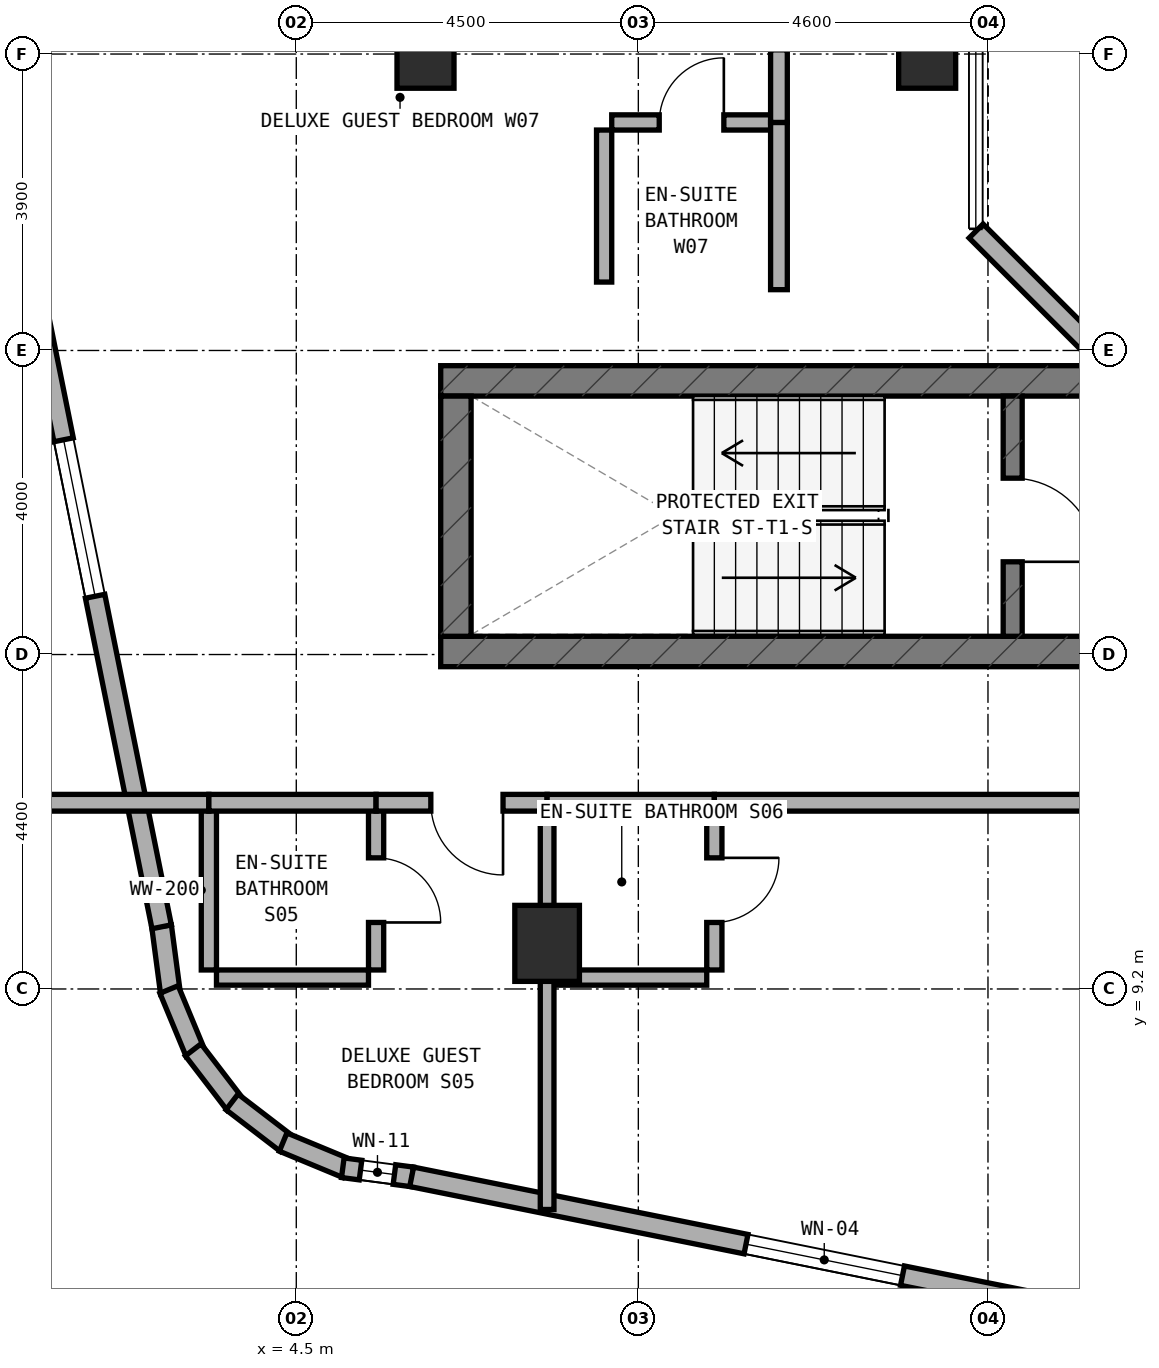
"""IFC4 building model, lengths in metres.
Left out: names, types, materials, properties, quantities, classifications, styles, units other than length and angle.
Written with IfcOpenShell. Run it as: python <this file> out.ifc"""

import sys

from ifc_helpers import new_model, si_unit, direction, frame, frame_2d, origin, origin_2d, place, context, subcontext, project, spatial, rectangle, extrude, element, fill, save


model = new_model("IFC4")
c1 = context("Model", 3, precision=1e-05, world=origin(), true_north=direction((0.0, 1.0)))
c2 = subcontext(c1, "Body", "Model", "MODEL_VIEW")
j1 = project(units=[si_unit("LENGTHUNIT", "METRE"), si_unit("PLANEANGLEUNIT", "RADIAN")], contexts=[c1])
p1 = place(None, origin())
s1 = spatial("IfcSite", under=j1, at=p1, CompositionType="ELEMENT")
p2 = place(p1, origin())
s2 = spatial("IfcBuilding", under=s1, at=p2, CompositionType="ELEMENT")
p3 = place(p2, frame((0.0, 0.0, 152.0)))
s3 = spatial("IfcBuildingStorey", under=s2, at=p3, CompositionType="ELEMENT", Elevation=152.0)
p4 = place(p3, frame((6.4, 13.64, 0.0), z_axis=(0.0, 0.0, 1.0), x_axis=(1.0, 0.0, 0.0)))
e1 = element("IfcWall", 1, at=p4, inside=s3, PredefinedType="SHEAR", context=c2, shape_type="SweptSolid", body=[
    extrude(rectangle(XDim=24.4, YDim=0.4, at=frame_2d((12.2, 0.0))), origin(), (0.0, 0.0, 1.0), 3.5),
])
p5 = place(p4, frame((9.15, 0.0, 0.0)))
e2 = element("IfcOpeningElement", 2, at=p5, cuts=e1, PredefinedType="OPENING", context=c2, shape_type="SweptSolid", body=[
    extrude(rectangle(XDim=1.2, YDim=2.15, at=frame_2d((0.6, 1.075))), frame((0.0, 0.21, 0.0), z_axis=(0.0, -1.0, 0.0), x_axis=(1.0, 0.0, 0.0)), (0.0, 0.0, 1.0), 0.42),
])
p6 = place(p4, frame((16.94, 0.0, 0.0)))
e3 = element("IfcOpeningElement", 3, at=p6, cuts=e1, PredefinedType="OPENING", context=c2, shape_type="SweptSolid", body=[
    extrude(rectangle(XDim=0.85, YDim=2.1, at=frame_2d((0.425, 1.05))), frame((0.0, 0.21, 0.0), z_axis=(0.0, -1.0, 0.0), x_axis=(1.0, 0.0, 0.0)), (0.0, 0.0, 1.0), 0.42),
])
p7 = place(p4, frame((18.783, 0.0, 0.0)))
e4 = element("IfcOpeningElement", 4, at=p7, cuts=e1, PredefinedType="OPENING", context=c2, shape_type="SweptSolid", body=[
    extrude(rectangle(XDim=1.1, YDim=2.15, at=frame_2d((0.55, 1.075))), frame((0.0, 0.21, 0.0), z_axis=(0.0, -1.0, 0.0), x_axis=(1.0, 0.0, 0.0)), (0.0, 0.0, 1.0), 0.42),
])
p8 = place(p4, frame((20.65, 0.0, 0.0)))
e5 = element("IfcOpeningElement", 5, at=p8, cuts=e1, PredefinedType="OPENING", context=c2, shape_type="SweptSolid", body=[
    extrude(rectangle(XDim=1.1, YDim=2.15, at=frame_2d((0.55, 1.075))), frame((0.0, 0.21, 0.0), z_axis=(0.0, -1.0, 0.0), x_axis=(1.0, 0.0, 0.0)), (0.0, 0.0, 1.0), 0.42),
])
p9 = place(p4, frame((22.517, 0.0, 0.0)))
e6 = element("IfcOpeningElement", 6, at=p9, cuts=e1, PredefinedType="OPENING", context=c2, shape_type="SweptSolid", body=[
    extrude(rectangle(XDim=1.1, YDim=2.15, at=frame_2d((0.55, 1.075))), frame((0.0, 0.21, 0.0), z_axis=(0.0, -1.0, 0.0), x_axis=(1.0, 0.0, 0.0)), (0.0, 0.0, 1.0), 0.42),
])
p10 = place(p3, frame((6.4, 17.2, 0.0), z_axis=(0.0, 0.0, 1.0), x_axis=(1.0, 0.0, 0.0)))
e7 = element("IfcWall", 7, at=p10, inside=s3, PredefinedType="SHEAR", context=c2, shape_type="SweptSolid", body=[
    extrude(rectangle(XDim=24.4, YDim=0.4, at=frame_2d((12.2, 0.0))), origin(), (0.0, 0.0, 1.0), 3.5),
])
p11 = place(p3, frame((6.6, 13.84, 0.0), z_axis=(0.0, 0.0, 1.0), x_axis=(0.0, 1.0, 0.0)))
e8 = element("IfcWall", 8, at=p11, inside=s3, PredefinedType="SHEAR", context=c2, shape_type="SweptSolid", body=[
    extrude(rectangle(XDim=3.16, YDim=0.4, at=frame_2d((1.58, 0.0))), origin(), (0.0, 0.0, 1.0), 3.5),
])
p12 = place(p3, frame((13.925, 13.84, 0.0), z_axis=(0.0, 0.0, 1.0), x_axis=(0.0, 1.0, 0.0)))
e9 = element("IfcWall", 9, at=p12, inside=s3, PredefinedType="STANDARD", context=c2, shape_type="SweptSolid", body=[
    extrude(rectangle(XDim=3.16, YDim=0.25, at=frame_2d((1.58, 0.0))), origin(), (0.0, 0.0, 1.0), 3.22),
])
p13 = place(p12, frame((0.98, 0.0, 0.0)))
e10 = element("IfcOpeningElement", 10, at=p13, cuts=e9, PredefinedType="OPENING", context=c2, shape_type="SweptSolid", body=[
    extrude(rectangle(XDim=1.1, YDim=2.15, at=frame_2d((0.55, 1.075))), frame((0.0, 0.135, 0.0), z_axis=(0.0, -1.0, 0.0), x_axis=(1.0, 0.0, 0.0)), (0.0, 0.0, 1.0), 0.27),
])
p14 = place(p3, frame((6.2, 21.5, 0.0), z_axis=(0.0, 0.0, 1.0), x_axis=(1.0, 0.0, 0.0)))
e11 = element("IfcColumn", 11, at=p14, inside=s3, PredefinedType="COLUMN", context=c2, shape_type="SweptSolid", body=[
    extrude(rectangle(XDim=0.75, YDim=0.9, at=origin_2d()), origin(), (0.0, 0.0, 1.0), 3.5),
])
p15 = place(p3, frame((7.8, 9.8, 0.0), z_axis=(0.0, 0.0, 1.0), x_axis=(1.0, 0.0, 0.0)))
e12 = element("IfcColumn", 12, at=p15, inside=s3, PredefinedType="COLUMN", context=c2, shape_type="SweptSolid", body=[
    extrude(rectangle(XDim=0.85, YDim=1.0, at=origin_2d()), origin(), (0.0, 0.0, 1.0), 3.5),
])
p16 = place(p3, frame((12.8, 21.5, 0.0), z_axis=(0.0, 0.0, 1.0), x_axis=(1.0, 0.0, 0.0)))
e13 = element("IfcColumn", 13, at=p16, inside=s3, PredefinedType="COLUMN", context=c2, shape_type="SweptSolid", body=[
    extrude(rectangle(XDim=0.75, YDim=0.9, at=origin_2d()), origin(), (0.0, 0.0, 1.0), 3.5),
])
p17 = place(p3, frame((2.728, 10.025, 0.0), z_axis=(0.0, 0.0, 1.0), x_axis=(0.130953706898, -0.991388484223, 0.0)))
e14 = element("IfcWall", 14, at=p17, inside=s3, PredefinedType="STANDARD", context=c2, shape_type="SweptSolid", body=[
    extrude(rectangle(XDim=0.885, YDim=0.26, at=frame_2d((0.443, 0.0))), origin(), (0.0, 0.0, 1.0), 3.22),
])
p18 = place(p3, frame((2.826, 9.193, 0.0), z_axis=(0.0, 0.0, 1.0), x_axis=(0.383290660547, -0.923627776508, 0.0)))
e15 = element("IfcWall", 15, at=p18, inside=s3, PredefinedType="STANDARD", context=c2, shape_type="SweptSolid", body=[
    extrude(rectangle(XDim=0.903, YDim=0.26, at=frame_2d((0.452, 0.0))), origin(), (0.0, 0.0, 1.0), 3.22),
])
p19 = place(p3, frame((3.144, 8.399, 0.0), z_axis=(0.0, 0.0, 1.0), x_axis=(0.608624690463, -0.793458244748, 0.0)))
e16 = element("IfcWall", 16, at=p19, inside=s3, PredefinedType="STANDARD", context=c2, shape_type="SweptSolid", body=[
    extrude(rectangle(XDim=0.902, YDim=0.26, at=frame_2d((0.451, 0.0))), origin(), (0.0, 0.0, 1.0), 3.22),
])
p20 = place(p3, frame((3.655, 7.714, 0.0), z_axis=(0.0, 0.0, 1.0), x_axis=(0.793558456666, -0.608494022858, 0.0)))
e17 = element("IfcWall", 17, at=p20, inside=s3, PredefinedType="STANDARD", context=c2, shape_type="SweptSolid", body=[
    extrude(rectangle(XDim=0.902, YDim=0.26, at=frame_2d((0.451, 0.0))), origin(), (0.0, 0.0, 1.0), 3.22),
])
p21 = place(p3, frame((4.327, 7.186, 0.0), z_axis=(0.0, 0.0, 1.0), x_axis=(0.923683767999, -0.383155708213, 0.0)))
e18 = element("IfcWall", 18, at=p21, inside=s3, PredefinedType="STANDARD", context=c2, shape_type="SweptSolid", body=[
    extrude(rectangle(XDim=0.903, YDim=0.26, at=frame_2d((0.451, 0.0))), origin(), (0.0, 0.0, 1.0), 3.22),
])
p22 = place(p3, frame((5.112, 6.848, 0.0), z_axis=(0.0, 0.0, 1.0), x_axis=(0.991487658083, -0.130200706103, 0.0)))
e19 = element("IfcWall", 19, at=p22, inside=s3, PredefinedType="STANDARD", context=c2, shape_type="SweptSolid", body=[
    extrude(rectangle(XDim=0.921, YDim=0.26, at=frame_2d((0.46, 0.0))), origin(), (0.0, 0.0, 1.0), 3.22),
])
p23 = place(p22, frame((0.235, 0.0, 0.85)))
e20 = element("IfcOpeningElement", 20, at=p23, cuts=e19, PredefinedType="OPENING", context=c2, shape_type="SweptSolid", body=[
    extrude(rectangle(XDim=0.45, YDim=1.5, at=frame_2d((0.225, 0.75))), frame((0.0, 0.14, 0.0), z_axis=(0.0, -1.0, 0.0), x_axis=(1.0, 0.0, 0.0)), (0.0, 0.0, 1.0), 0.28),
])
p24 = place(p3, frame((6.018, 6.729, 0.0), z_axis=(0.0, 0.0, 1.0), x_axis=(0.980315963543, -0.197435082048, 0.0)))
e21 = element("IfcWall", 21, at=p24, inside=s3, PredefinedType="STANDARD", context=c2, shape_type="SweptSolid", body=[
    extrude(rectangle(XDim=9.183, YDim=0.26, at=frame_2d((4.591, 0.0))), origin(), (0.0, 0.0, 1.0), 3.22),
])
p25 = place(p24, frame((4.487, 0.0, 0.85)))
e22 = element("IfcOpeningElement", 22, at=p25, cuts=e21, PredefinedType="OPENING", context=c2, shape_type="SweptSolid", body=[
    extrude(rectangle(XDim=2.1, YDim=1.5, at=frame_2d((1.05, 0.75))), frame((0.0, 0.14, 0.0), z_axis=(0.0, -1.0, 0.0), x_axis=(1.0, 0.0, 0.0)), (0.0, 0.0, 1.0), 0.28),
])
p26 = place(p3, frame((0.916, 19.02, 0.0), z_axis=(0.0, 0.0, 1.0), x_axis=(0.197435082048, -0.980315963543, 0.0)))
e23 = element("IfcWall", 23, at=p26, inside=s3, PredefinedType="STANDARD", context=c2, shape_type="SweptSolid", body=[
    extrude(rectangle(XDim=9.183, YDim=0.26, at=frame_2d((4.591, 0.0))), origin(), (0.0, 0.0, 1.0), 3.22),
])
p27 = place(p26, frame((2.647, 0.0, 0.85)))
e24 = element("IfcOpeningElement", 24, at=p27, cuts=e23, PredefinedType="OPENING", context=c2, shape_type="SweptSolid", body=[
    extrude(rectangle(XDim=2.1, YDim=1.5, at=frame_2d((1.05, 0.75))), frame((0.0, 0.14, 0.0), z_axis=(0.0, -1.0, 0.0), x_axis=(1.0, 0.0, 0.0)), (0.0, 0.0, 1.0), 0.28),
])
p28 = place(p3, frame((13.444, 19.172, 0.0), z_axis=(0.0, 0.0, 1.0), x_axis=(0.707059717605, -0.707153841636, 0.0)))
e25 = element("IfcWall", 25, at=p28, inside=s3, PredefinedType="STANDARD", context=c2, shape_type="SweptSolid", body=[
    extrude(rectangle(XDim=2.594, YDim=0.26, at=frame_2d((1.297, 0.0))), origin(), (0.0, 0.0, 1.0), 3.22),
])
p29 = place(p3, frame((5.55, 9.45, 0.0), z_axis=(0.0, 0.0, 1.0), x_axis=(0.0, 1.0, 0.0)))
e26 = element("IfcWall", 26, at=p29, inside=s3, PredefinedType="PLUMBINGWALL", context=c2, shape_type="SweptSolid", body=[
    extrude(rectangle(XDim=2.1, YDim=0.2, at=frame_2d((1.05, 0.0))), origin(), (0.0, 0.0, 1.0), 3.22),
])
p30 = place(p29, frame((0.625, 0.0, 0.0)))
e27 = element("IfcOpeningElement", 27, at=p30, cuts=e26, PredefinedType="OPENING", context=c2, shape_type="SweptSolid", body=[
    extrude(rectangle(XDim=0.85, YDim=2.1, at=frame_2d((0.425, 1.05))), frame((0.0, 0.11, 0.0), z_axis=(0.0, -1.0, 0.0), x_axis=(1.0, 0.0, 0.0)), (0.0, 0.0, 1.0), 0.22),
])
p31 = place(p3, frame((3.45, 9.35, 0.0), z_axis=(0.0, 0.0, 1.0), x_axis=(1.0, 0.0, 0.0)))
e28 = element("IfcWall", 28, at=p31, inside=s3, PredefinedType="PLUMBINGWALL", context=c2, shape_type="SweptSolid", body=[
    extrude(rectangle(XDim=2.0, YDim=0.2, at=frame_2d((1.0, 0.0))), origin(), (0.0, 0.0, 1.0), 3.22),
])
p32 = place(p3, frame((3.35, 9.45, 0.0), z_axis=(0.0, 0.0, 1.0), x_axis=(0.0, 1.0, 0.0)))
e29 = element("IfcWall", 29, at=p32, inside=s3, PredefinedType="PLUMBINGWALL", context=c2, shape_type="SweptSolid", body=[
    extrude(rectangle(XDim=2.1, YDim=0.2, at=frame_2d((1.05, 0.0))), origin(), (0.0, 0.0, 1.0), 3.22),
])
p33 = place(p3, frame((0.96, 11.65, 0.0), z_axis=(0.0, 0.0, 1.0), x_axis=(1.0, 0.0, 0.0)))
e30 = element("IfcWall", 30, at=p33, inside=s3, PredefinedType="SOLIDWALL", context=c2, shape_type="SweptSolid", body=[
    extrude(rectangle(XDim=2.39, YDim=0.22, at=frame_2d((1.195, 0.0))), origin(), (0.0, 0.0, 1.0), 3.22),
])
p34 = place(p3, frame((3.35, 11.65, 0.0), z_axis=(0.0, 0.0, 1.0), x_axis=(1.0, 0.0, 0.0)))
e31 = element("IfcWall", 31, at=p34, inside=s3, PredefinedType="SOLIDWALL", context=c2, shape_type="SweptSolid", body=[
    extrude(rectangle(XDim=2.2, YDim=0.22, at=frame_2d((1.1, 0.0))), origin(), (0.0, 0.0, 1.0), 3.22),
])
p35 = place(p3, frame((5.55, 11.65, 0.0), z_axis=(0.0, 0.0, 1.0), x_axis=(1.0, 0.0, 0.0)))
e32 = element("IfcWall", 32, at=p35, inside=s3, PredefinedType="SOLIDWALL", context=c2, shape_type="SweptSolid", body=[
    extrude(rectangle(XDim=2.25, YDim=0.22, at=frame_2d((1.125, 0.0))), origin(), (0.0, 0.0, 1.0), 2.795),
])
p36 = place(p35, frame((0.72, 0.0, 0.0)))
e33 = element("IfcOpeningElement", 33, at=p36, cuts=e32, PredefinedType="OPENING", context=c2, shape_type="SweptSolid", body=[
    extrude(rectangle(XDim=0.95, YDim=2.1, at=frame_2d((0.475, 1.05))), frame((0.0, 0.12, 0.0), z_axis=(0.0, -1.0, 0.0), x_axis=(1.0, 0.0, 0.0)), (0.0, 0.0, 1.0), 0.24),
])
p37 = place(p3, frame((7.8, 6.299, 0.0), z_axis=(0.0, 0.0, 1.0), x_axis=(0.0, 1.0, 0.0)))
e34 = element("IfcWall", 34, at=p37, inside=s3, PredefinedType="SOLIDWALL", context=c2, shape_type="SweptSolid", body=[
    extrude(rectangle(XDim=5.351, YDim=0.18, at=frame_2d((2.675, 0.0))), origin(), (0.0, 0.0, 1.0), 2.795),
])
p38 = place(p3, frame((10.0, 9.45, 0.0), z_axis=(0.0, 0.0, 1.0), x_axis=(0.0, 1.0, 0.0)))
e35 = element("IfcWall", 35, at=p38, inside=s3, PredefinedType="PLUMBINGWALL", context=c2, shape_type="SweptSolid", body=[
    extrude(rectangle(XDim=2.1, YDim=0.2, at=frame_2d((1.05, 0.0))), origin(), (0.0, 0.0, 1.0), 2.745),
])
p39 = place(p38, frame((0.625, 0.0, 0.0)))
e36 = element("IfcOpeningElement", 36, at=p39, cuts=e35, PredefinedType="OPENING", context=c2, shape_type="SweptSolid", body=[
    extrude(rectangle(XDim=0.85, YDim=2.1, at=frame_2d((0.425, 1.05))), frame((0.0, 0.11, 0.0), z_axis=(0.0, -1.0, 0.0), x_axis=(1.0, 0.0, 0.0)), (0.0, 0.0, 1.0), 0.22),
])
p40 = place(p3, frame((7.9, 9.35, 0.0), z_axis=(0.0, 0.0, 1.0), x_axis=(1.0, 0.0, 0.0)))
e37 = element("IfcWall", 37, at=p40, inside=s3, PredefinedType="PLUMBINGWALL", context=c2, shape_type="SweptSolid", body=[
    extrude(rectangle(XDim=2.0, YDim=0.2, at=frame_2d((1.0, 0.0))), origin(), (0.0, 0.0, 1.0), 3.22),
])
p41 = place(p3, frame((7.8, 11.65, 0.0), z_axis=(0.0, 0.0, 1.0), x_axis=(1.0, 0.0, 0.0)))
e38 = element("IfcWall", 38, at=p41, inside=s3, PredefinedType="SOLIDWALL", context=c2, shape_type="SweptSolid", body=[
    extrude(rectangle(XDim=2.2, YDim=0.22, at=frame_2d((1.1, 0.0))), origin(), (0.0, 0.0, 1.0), 2.795),
])
p42 = place(p3, frame((10.0, 11.65, 0.0), z_axis=(0.0, 0.0, 1.0), x_axis=(1.0, 0.0, 0.0)))
e39 = element("IfcWall", 39, at=p42, inside=s3, PredefinedType="SOLIDWALL", context=c2, shape_type="SweptSolid", body=[
    extrude(rectangle(XDim=15.8, YDim=0.22, at=frame_2d((7.9, 0.0))), origin(), (0.0, 0.0, 1.0), 2.795),
])
p43 = place(p42, frame((7.425, 0.0, 0.0)))
e40 = element("IfcOpeningElement", 40, at=p43, cuts=e39, PredefinedType="OPENING", context=c2, shape_type="SweptSolid", body=[
    extrude(rectangle(XDim=0.95, YDim=2.1, at=frame_2d((0.475, 1.05))), frame((0.0, 0.12, 0.0), z_axis=(0.0, -1.0, 0.0), x_axis=(1.0, 0.0, 0.0)), (0.0, 0.0, 1.0), 0.24),
])
p44 = place(p3, frame((8.65, 20.6, 0.0), z_axis=(0.0, 0.0, 1.0), x_axis=(1.0, 0.0, 0.0)))
e41 = element("IfcWall", 41, at=p44, inside=s3, PredefinedType="PLUMBINGWALL", context=c2, shape_type="SweptSolid", body=[
    extrude(rectangle(XDim=2.1, YDim=0.2, at=frame_2d((1.05, 0.0))), origin(), (0.0, 0.0, 1.0), 3.22),
])
p45 = place(p44, frame((0.625, 0.0, 0.0)))
e42 = element("IfcOpeningElement", 42, at=p45, cuts=e41, PredefinedType="OPENING", context=c2, shape_type="SweptSolid", body=[
    extrude(rectangle(XDim=0.85, YDim=2.1, at=frame_2d((0.425, 1.05))), frame((0.0, 0.11, 0.0), z_axis=(0.0, -1.0, 0.0), x_axis=(1.0, 0.0, 0.0)), (0.0, 0.0, 1.0), 0.22),
])
p46 = place(p3, frame((8.55, 18.5, 0.0), z_axis=(0.0, 0.0, 1.0), x_axis=(0.0, 1.0, 0.0)))
e43 = element("IfcWall", 43, at=p46, inside=s3, PredefinedType="PLUMBINGWALL", context=c2, shape_type="SweptSolid", body=[
    extrude(rectangle(XDim=2.0, YDim=0.2, at=frame_2d((1.0, 0.0))), origin(), (0.0, 0.0, 1.0), 3.22),
])
p47 = place(p3, frame((10.85, 18.4, 0.0), z_axis=(0.0, 0.0, 1.0), x_axis=(0.0, 1.0, 0.0)))
e44 = element("IfcWall", 44, at=p47, inside=s3, PredefinedType="SOLIDWALL", context=c2, shape_type="SweptSolid", body=[
    extrude(rectangle(XDim=2.2, YDim=0.22, at=frame_2d((1.1, 0.0))), origin(), (0.0, 0.0, 1.0), 3.22),
])
p48 = place(p3, frame((10.85, 20.6, 0.0), z_axis=(0.0, 0.0, 1.0), x_axis=(0.0, 1.0, 0.0)))
e45 = element("IfcWall", 45, at=p48, inside=s3, PredefinedType="SOLIDWALL", context=c2, shape_type="SweptSolid", body=[
    extrude(rectangle(XDim=2.86, YDim=0.22, at=frame_2d((1.43, 0.0))), origin(), (0.0, 0.0, 1.0), 2.795),
])
p49 = place(p48, frame((0.955, 0.0, 0.0)))
e46 = element("IfcOpeningElement", 46, at=p49, cuts=e45, PredefinedType="OPENING", context=c2, shape_type="SweptSolid", body=[
    extrude(rectangle(XDim=0.95, YDim=2.1, at=frame_2d((0.475, 1.05))), frame((0.0, 0.12, 0.0), z_axis=(0.0, -1.0, 0.0), x_axis=(1.0, 0.0, 0.0)), (0.0, 0.0, 1.0), 0.24),
])
p50 = place(p25, origin())
e47 = element("IfcWindow", 47, at=p50, inside=s3, PartitioningType="SINGLE_PANEL", PredefinedType="WINDOW", context=c2, shape_type="SweptSolid", body=[
    extrude(rectangle(XDim=2.1, YDim=1.5, at=frame_2d((1.05, 0.75))), frame((0.0, 0.03, 0.0), z_axis=(0.0, -1.0, 0.0), x_axis=(1.0, 0.0, 0.0)), (0.0, 0.0, 1.0), 0.06),
])
fill(e22, e47)
p51 = place(p27, origin())
e48 = element("IfcWindow", 48, at=p51, inside=s3, PartitioningType="SINGLE_PANEL", PredefinedType="WINDOW", context=c2, shape_type="SweptSolid", body=[
    extrude(rectangle(XDim=2.1, YDim=1.5, at=frame_2d((1.05, 0.75))), frame((0.0, 0.03, 0.0), z_axis=(0.0, -1.0, 0.0), x_axis=(1.0, 0.0, 0.0)), (0.0, 0.0, 1.0), 0.06),
])
fill(e24, e48)
p52 = place(p23, origin())
e49 = element("IfcWindow", 49, at=p52, inside=s3, PartitioningType="SINGLE_PANEL", PredefinedType="WINDOW", context=c2, shape_type="SweptSolid", body=[
    extrude(rectangle(XDim=0.45, YDim=1.5, at=frame_2d((0.225, 0.75))), frame((0.0, 0.03, 0.0), z_axis=(0.0, -1.0, 0.0), x_axis=(1.0, 0.0, 0.0)), (0.0, 0.0, 1.0), 0.06),
])
fill(e20, e49)
p53 = place(p13, frame((1.1, 0.0, 0.0), z_axis=(0.0, 0.0, 1.0), x_axis=(-1.0, 0.0, 0.0)))
e50 = element("IfcDoor", 50, at=p53, inside=s3, OperationType="SINGLE_SWING_RIGHT", PredefinedType="DOOR", context=c2, shape_type="SweptSolid", body=[
    extrude(rectangle(XDim=1.1, YDim=2.15, at=frame_2d((0.55, 1.075))), frame((0.0, 0.025, 0.0), z_axis=(0.0, -1.0, 0.0), x_axis=(1.0, 0.0, 0.0)), (0.0, 0.0, 1.0), 0.05),
])
fill(e10, e50)
p54 = place(p30, frame((0.85, 0.0, 0.0), z_axis=(0.0, 0.0, 1.0), x_axis=(-1.0, 0.0, 0.0)))
e51 = element("IfcDoor", 51, at=p54, inside=s3, OperationType="SINGLE_SWING_RIGHT", PredefinedType="DOOR", context=c2, shape_type="SweptSolid", body=[
    extrude(rectangle(XDim=0.85, YDim=2.1, at=frame_2d((0.425, 1.05))), frame((0.0, 0.025, 0.0), z_axis=(0.0, -1.0, 0.0), x_axis=(1.0, 0.0, 0.0)), (0.0, 0.0, 1.0), 0.05),
])
fill(e27, e51)
p55 = place(p36, frame((0.95, 0.0, 0.0), z_axis=(0.0, 0.0, 1.0), x_axis=(-1.0, 0.0, 0.0)))
e52 = element("IfcDoor", 52, at=p55, inside=s3, OperationType="SINGLE_SWING_LEFT", PredefinedType="DOOR", context=c2, shape_type="SweptSolid", body=[
    extrude(rectangle(XDim=0.95, YDim=2.1, at=frame_2d((0.475, 1.05))), frame((0.0, 0.025, 0.0), z_axis=(0.0, -1.0, 0.0), x_axis=(1.0, 0.0, 0.0)), (0.0, 0.0, 1.0), 0.05),
])
fill(e33, e52)
p56 = place(p39, frame((0.85, 0.0, 0.0), z_axis=(0.0, 0.0, 1.0), x_axis=(-1.0, 0.0, 0.0)))
e53 = element("IfcDoor", 53, at=p56, inside=s3, OperationType="SINGLE_SWING_LEFT", PredefinedType="DOOR", context=c2, shape_type="SweptSolid", body=[
    extrude(rectangle(XDim=0.85, YDim=2.1, at=frame_2d((0.425, 1.05))), frame((0.0, 0.025, 0.0), z_axis=(0.0, -1.0, 0.0), x_axis=(1.0, 0.0, 0.0)), (0.0, 0.0, 1.0), 0.05),
])
fill(e36, e53)
p57 = place(p45, origin())
e54 = element("IfcDoor", 54, at=p57, inside=s3, OperationType="SINGLE_SWING_RIGHT", PredefinedType="DOOR", context=c2, shape_type="SweptSolid", body=[
    extrude(rectangle(XDim=0.85, YDim=2.1, at=frame_2d((0.425, 1.05))), frame((0.0, 0.025, 0.0), z_axis=(0.0, -1.0, 0.0), x_axis=(1.0, 0.0, 0.0)), (0.0, 0.0, 1.0), 0.05),
])
fill(e42, e54)
save(model, sys.argv[1])
